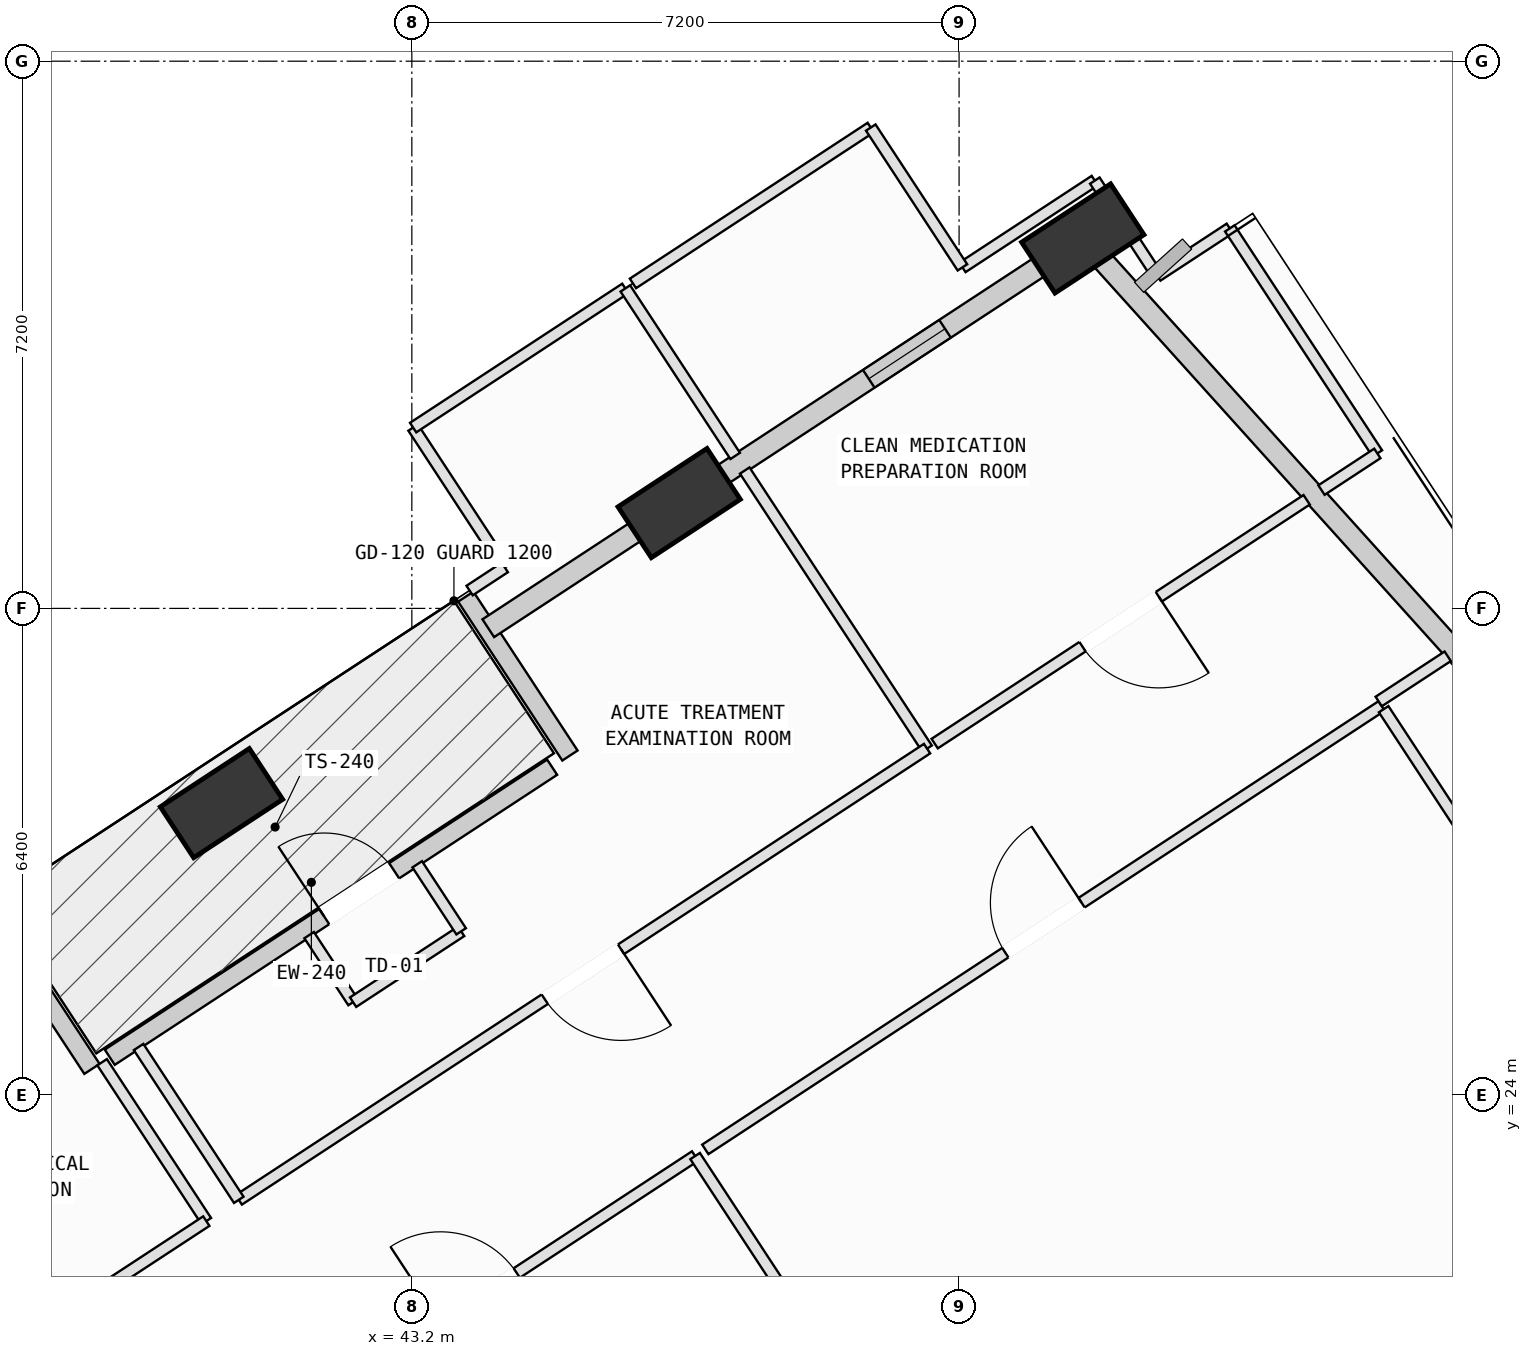
"""IFC4 building model, lengths in metres.
Left out: names, types, materials, properties, quantities, classifications, styles, units other than length and angle.
Written with IfcOpenShell. Run it as: python <this file> out.ifc"""

import sys

from ifc_helpers import new_model, si_unit, direction, frame, frame_2d, origin, origin_2d, place, context, subcontext, project, spatial, rectangle, extrude, element, fill, save


model = new_model("IFC4")
c1 = context("Model", 3, precision=1e-05, world=origin(), true_north=direction((0.0, 1.0)))
c2 = subcontext(c1, "Body", "Model", "MODEL_VIEW")
j1 = project(units=[si_unit("LENGTHUNIT", "METRE"), si_unit("PLANEANGLEUNIT", "RADIAN")], contexts=[c1])
p1 = place(None, origin())
s1 = spatial("IfcSite", under=j1, at=p1, CompositionType="ELEMENT")
p2 = place(p1, origin())
s2 = spatial("IfcBuilding", under=s1, at=p2, CompositionType="ELEMENT")
p3 = place(p2, frame((0.0, 0.0, 165.8)))
s3 = spatial("IfcBuildingStorey", under=s2, at=p3, CompositionType="ELEMENT", Elevation=165.8)
p4 = place(p3, frame((52.028, 35.268, 0.002), z_axis=(-0.043877725152, 0.075705811496, 0.996164331494), x_axis=(-0.449659174305, -0.89191078624, 0.047976831414)))
e1 = element("IfcColumn", 1, at=p4, inside=s3, PredefinedType="COLUMN", context=c2, shape_type="SweptSolid", body=[
    extrude(rectangle(XDim=1.4, YDim=0.8, at=origin_2d()), origin(), (0.0, 0.0, 1.0), 4.012),
])
p5 = place(p3, frame((46.717, 31.786, 0.002), z_axis=(-0.029390162986, 0.054024241505, 0.998107008116), x_axis=(-0.473093074248, -0.880366887856, 0.033720703821)))
e2 = element("IfcColumn", 2, at=p5, inside=s3, PredefinedType="COLUMN", context=c2, shape_type="SweptSolid", body=[
    extrude(rectangle(XDim=1.4, YDim=0.8, at=origin_2d()), origin(), (0.0, 0.0, 1.0), 4.004),
])
p6 = place(p3, frame((40.696, 27.838, 0.002), z_axis=(-0.012883611471, 0.029308689603, 0.999487375243), x_axis=(-0.545052318334, -0.838218249125, 0.017553834713)))
e3 = element("IfcColumn", 3, at=p6, inside=s3, PredefinedType="COLUMN", context=c2, shape_type="SweptSolid", body=[
    extrude(rectangle(XDim=1.4, YDim=0.8, at=origin_2d()), origin(), (0.0, 0.0, 1.0), 3.998),
])
p7 = place(p3, frame((39.226, 24.494, 0.0), z_axis=(0.0, 0.0, 1.0), x_axis=(0.83628365525, 0.548297043547, 0.0)))
e4 = element("IfcWall", 4, at=p7, inside=s3, PredefinedType="SOLIDWALL", context=c2, shape_type="SweptSolid", body=[
    extrude(rectangle(XDim=6.96, YDim=0.24, at=frame_2d((3.48, 0.0))), origin(), (0.0, 0.0, 1.0), 3.045),
])
p8 = place(p7, frame((3.375, 0.0, 0.0)))
e5 = element("IfcOpeningElement", 5, at=p8, cuts=e4, PredefinedType="OPENING", context=c2, shape_type="SweptSolid", body=[
    extrude(rectangle(XDim=1.1, YDim=2.15, at=frame_2d((0.55, 1.075))), frame((0.0, 0.13, 0.0), z_axis=(0.0, -1.0, 0.0), x_axis=(1.0, 0.0, 0.0)), (0.0, 0.0, 1.0), 0.26),
])
p9 = place(p3, frame((37.621, 26.432, 0.0), z_axis=(0.0, 0.0, 1.0), x_axis=(0.548306585328, -0.836277399244, 0.0)))
e6 = element("IfcWall", 6, at=p9, inside=s3, PredefinedType="SOLIDWALL", context=c2, shape_type="SweptSolid", body=[
    extrude(rectangle(XDim=2.5, YDim=0.24, at=frame_2d((1.25, 0.0))), origin(), (0.0, 0.0, 1.0), 3.165),
])
p10 = place(p3, frame((45.28, 28.464, 0.0), z_axis=(0.0, 0.0, 1.0), x_axis=(-0.548351364429, 0.836248038042, 0.0)))
e7 = element("IfcWall", 7, at=p10, inside=s3, PredefinedType="SOLIDWALL", context=c2, shape_type="SweptSolid", body=[
    extrude(rectangle(XDim=2.5, YDim=0.24, at=frame_2d((1.25, 0.0))), origin(), (0.0, 0.0, 1.0), 3.165),
])
p11 = place(p3, frame((52.244, 35.028, 0.0), z_axis=(0.0, 0.0, 1.0), x_axis=(0.669657355031, -0.742670200596, 0.0)))
e8 = element("IfcWall", 8, at=p11, inside=s3, PredefinedType="SOLIDWALL", context=c2, shape_type="SweptSolid", body=[
    extrude(rectangle(XDim=8.838, YDim=0.28, at=frame_2d((4.419, 0.0))), origin(), (0.0, 0.0, 1.0), 3.165),
])
p12 = place(p3, frame((47.128, 32.055, 0.0), z_axis=(0.0, 0.0, 1.0), x_axis=(0.836292582583, 0.548283426995, 0.0)))
e9 = element("IfcWall", 9, at=p12, inside=s3, PredefinedType="SOLIDWALL", context=c2, shape_type="SweptSolid", body=[
    extrude(rectangle(XDim=5.405, YDim=0.28, at=frame_2d((2.702, 0.0))), origin(), (0.0, 0.0, 1.0), 3.165),
])
p13 = place(p12, frame((2.492, 0.0, 0.75)))
e10 = element("IfcOpeningElement", 10, at=p13, cuts=e9, PredefinedType="OPENING", context=c2, shape_type="SweptSolid", body=[
    extrude(rectangle(XDim=1.2, YDim=1.75, at=frame_2d((0.6, 0.875))), frame((0.0, 0.15, 0.0), z_axis=(0.0, -1.0, 0.0), x_axis=(1.0, 0.0, 0.0)), (0.0, 0.0, 1.0), 0.3),
])
p14 = place(p3, frame((44.206, 30.139, 0.0), z_axis=(0.0, 0.0, 1.0), x_axis=(0.836311759285, 0.548254175799, 0.0)))
e11 = element("IfcWall", 11, at=p14, inside=s3, PredefinedType="SOLIDWALL", context=c2, shape_type="SweptSolid", body=[
    extrude(rectangle(XDim=2.532, YDim=0.28, at=frame_2d((1.266, 0.0))), origin(), (0.0, 0.0, 1.0), 3.045),
])
p15 = place(p3, frame((41.23, 19.459, 0.0), z_axis=(0.0, 0.0, 1.0), x_axis=(0.836287739874, 0.548290813471, 0.0)))
e12 = element("IfcWall", 12, at=p15, inside=s3, PredefinedType="PARTITIONING", context=c2, shape_type="SweptSolid", body=[
    extrude(rectangle(XDim=6.812, YDim=0.15, at=frame_2d((3.406, 0.0))), origin(), (0.0, 0.0, 1.0), 3.065),
])
p16 = place(p15, frame((2.806, 0.0, 0.0)))
e13 = element("IfcOpeningElement", 13, at=p16, cuts=e12, PredefinedType="OPENING", context=c2, shape_type="SweptSolid", body=[
    extrude(rectangle(XDim=1.2, YDim=2.15, at=frame_2d((0.6, 1.075))), frame((0.0, 0.085, 0.0), z_axis=(0.0, -1.0, 0.0), x_axis=(1.0, 0.0, 0.0)), (0.0, 0.0, 1.0), 0.17),
])
p17 = place(p3, frame((46.927, 23.194, 0.0), z_axis=(0.0, 0.0, 1.0), x_axis=(0.54831669657, -0.836270769705, 0.0)))
e14 = element("IfcWall", 14, at=p17, inside=s3, PredefinedType="PARTITIONING", context=c2, shape_type="SweptSolid", body=[
    extrude(rectangle(XDim=13.485, YDim=0.15, at=frame_2d((6.743, 0.0))), origin(), (0.0, 0.0, 1.0), 3.415),
])
p18 = place(p3, frame((47.061, 23.282, 0.0), z_axis=(0.0, 0.0, 1.0), x_axis=(0.836276104337, 0.548308560315, 0.0)))
e15 = element("IfcWall", 15, at=p18, inside=s3, PredefinedType="PARTITIONING", context=c2, shape_type="SweptSolid", body=[
    extrude(rectangle(XDim=10.64, YDim=0.15, at=frame_2d((5.32, 0.0))), origin(), (0.0, 0.0, 1.0), 3.78),
])
p19 = place(p18, frame((4.72, 0.0, 0.0)))
e16 = element("IfcOpeningElement", 16, at=p19, cuts=e15, PredefinedType="OPENING", context=c2, shape_type="SweptSolid", body=[
    extrude(rectangle(XDim=1.2, YDim=2.15, at=frame_2d((0.6, 1.075))), frame((0.0, 0.085, 0.0), z_axis=(0.0, -1.0, 0.0), x_axis=(1.0, 0.0, 0.0)), (0.0, 0.0, 1.0), 0.17),
])
p20 = place(p3, frame((55.986, 29.074, 0.0), z_axis=(0.0, 0.0, 1.0), x_axis=(0.548346156001, -0.836251453332, 0.0)))
e17 = element("IfcWall", 17, at=p20, inside=s3, PredefinedType="PARTITIONING", context=c2, shape_type="SweptSolid", body=[
    extrude(rectangle(XDim=11.396, YDim=0.15, at=frame_2d((5.698, 0.0))), origin(), (0.0, 0.0, 1.0), 3.78),
])
p21 = place(p20, frame((5.268, 0.0, 0.0)))
e18 = element("IfcOpeningElement", 18, at=p21, cuts=e17, PredefinedType="OPENING", context=c2, shape_type="SweptSolid", body=[
    extrude(rectangle(XDim=0.86, YDim=2.06, at=frame_2d((0.43, 1.03))), frame((0.0, 0.085, 0.0), z_axis=(0.0, -1.0, 0.0), x_axis=(1.0, 0.0, 0.0)), (0.0, 0.0, 1.0), 0.17),
])
p22 = place(p3, frame((39.125, 24.429, 0.0), z_axis=(0.0, 0.0, 1.0), x_axis=(0.548330098424, -0.836261982373, 0.0)))
e19 = element("IfcWall", 19, at=p22, inside=s3, PredefinedType="PARTITIONING", context=c2, shape_type="SweptSolid", body=[
    extrude(rectangle(XDim=2.5, YDim=0.15, at=frame_2d((1.25, 0.0))), origin(), (0.0, 0.0, 1.0), 3.78),
])
p23 = place(p3, frame((40.496, 22.338, 0.0), z_axis=(0.0, 0.0, 1.0), x_axis=(-0.836310513297, -0.548256076436, 0.0)))
e20 = element("IfcWall", 20, at=p23, inside=s3, PredefinedType="PARTITIONING", context=c2, shape_type="SweptSolid", body=[
    extrude(rectangle(XDim=3.024, YDim=0.15, at=frame_2d((1.512, 0.0))), origin(), (0.0, 0.0, 1.0), 3.045),
])
p24 = place(p3, frame((44.423, 30.939, 0.0), z_axis=(0.0, 0.0, 1.0), x_axis=(-0.548178851416, 0.836361134236, 0.0)))
e21 = element("IfcWall", 21, at=p24, inside=s3, PredefinedType="PARTITIONING", context=c2, shape_type="SweptSolid", body=[
    extrude(rectangle(XDim=2.2, YDim=0.15, at=frame_2d((1.1, 0.0))), origin(), (0.0, 0.0, 1.0), 3.78),
])
p25 = place(p3, frame((43.217, 32.779, 0.0), z_axis=(0.0, 0.0, 1.0), x_axis=(0.83621138517, 0.548407256801, 0.0)))
e22 = element("IfcWall", 22, at=p25, inside=s3, PredefinedType="PARTITIONING", context=c2, shape_type="SweptSolid", body=[
    extrude(rectangle(XDim=3.339, YDim=0.15, at=frame_2d((1.669, 0.0))), origin(), (0.0, 0.0, 1.0), 3.78),
])
p26 = place(p3, frame((46.009, 34.61, 0.0), z_axis=(0.0, 0.0, 1.0), x_axis=(0.548292182189, -0.836286842507, 0.0)))
e23 = element("IfcWall", 23, at=p26, inside=s3, PredefinedType="PARTITIONING", context=c2, shape_type="SweptSolid", body=[
    extrude(rectangle(XDim=2.635, YDim=0.15, at=frame_2d((1.318, 0.0))), origin(), (0.0, 0.0, 1.0), 3.78),
])
p27 = place(p3, frame((47.58, 32.214, 0.0), z_axis=(0.0, 0.0, 1.0), x_axis=(0.548271243698, -0.836300569971, 0.0)))
e24 = element("IfcWall", 24, at=p27, inside=s3, PredefinedType="PARTITIONING", context=c2, shape_type="SweptSolid", body=[
    extrude(rectangle(XDim=4.375, YDim=0.15, at=frame_2d((2.188, 0.0))), origin(), (0.0, 0.0, 1.0), 3.78),
])
p28 = place(p3, frame((49.979, 28.555, 0.0), z_axis=(0.0, 0.0, 1.0), x_axis=(-0.836298938049, -0.548273732927, 0.0)))
e25 = element("IfcWall", 25, at=p28, inside=s3, PredefinedType="PARTITIONING", context=c2, shape_type="SweptSolid", body=[
    extrude(rectangle(XDim=10.829, YDim=0.15, at=frame_2d((5.414, 0.0))), origin(), (0.0, 0.0, 1.0), 3.78),
])
p29 = place(p28, frame((4.814, 0.0, 0.0)))
e26 = element("IfcOpeningElement", 26, at=p29, cuts=e25, PredefinedType="OPENING", context=c2, shape_type="SweptSolid", body=[
    extrude(rectangle(XDim=1.2, YDim=2.15, at=frame_2d((0.6, 1.075))), frame((0.0, 0.085, 0.0), z_axis=(0.0, -1.0, 0.0), x_axis=(1.0, 0.0, 0.0)), (0.0, 0.0, 1.0), 0.17),
])
p30 = place(p3, frame((40.923, 22.618, 0.0), z_axis=(0.0, 0.0, 1.0), x_axis=(-0.548192826292, 0.836351974471, 0.0)))
e27 = element("IfcWall", 27, at=p30, inside=s3, PredefinedType="PARTITIONING", context=c2, shape_type="SweptSolid", body=[
    extrude(rectangle(XDim=2.405, YDim=0.15, at=frame_2d((1.202, 0.0))), origin(), (0.0, 0.0, 1.0), 3.78),
])
p31 = place(p3, frame((41.849, 26.101, 0.0), z_axis=(0.0, 0.0, 1.0), x_axis=(0.548003914247, -0.836475767712, 0.0)))
e28 = element("IfcWall", 28, at=p31, inside=s3, PredefinedType="PARTITIONING", context=c2, shape_type="SweptSolid", body=[
    extrude(rectangle(XDim=1.054, YDim=0.15, at=frame_2d((0.527, 0.0))), origin(), (0.0, 0.0, 1.0), 3.78),
])
p32 = place(p3, frame((42.427, 25.219, 0.0), z_axis=(0.0, 0.0, 1.0), x_axis=(0.836420271781, 0.548088614144, 0.0)))
e29 = element("IfcWall", 29, at=p32, inside=s3, PredefinedType="PARTITIONING", context=c2, shape_type="SweptSolid", body=[
    extrude(rectangle(XDim=1.7, YDim=0.15, at=frame_2d((0.85, 0.0))), origin(), (0.0, 0.0, 1.0), 3.78),
])
p33 = place(p3, frame((43.849, 26.151, 0.0), z_axis=(0.0, 0.0, 1.0), x_axis=(-0.548165874885, 0.836369639341, 0.0)))
e30 = element("IfcWall", 30, at=p33, inside=s3, PredefinedType="PARTITIONING", context=c2, shape_type="SweptSolid", body=[
    extrude(rectangle(XDim=1.055, YDim=0.15, at=frame_2d((0.527, 0.0))), origin(), (0.0, 0.0, 1.0), 3.78),
])
p34 = place(p3, frame((43.96, 30.635, 0.0), z_axis=(0.0, 0.0, 1.0), x_axis=(0.836028958257, 0.548685320522, 0.0)))
e31 = element("IfcWall", 31, at=p34, inside=s3, PredefinedType="PARTITIONING", context=c2, shape_type="SweptSolid", body=[
    extrude(rectangle(XDim=0.554, YDim=0.15, at=frame_2d((0.277, 0.0))), origin(), (0.0, 0.0, 1.0), 3.145),
])
p35 = place(p3, frame((50.444, 34.887, 0.0), z_axis=(0.0, 0.0, 1.0), x_axis=(0.83628137168, 0.54830052652, 0.0)))
e32 = element("IfcWall", 32, at=p35, inside=s3, PredefinedType="PARTITIONING", context=c2, shape_type="SweptSolid", body=[
    extrude(rectangle(XDim=2.083, YDim=0.15, at=frame_2d((1.042, 0.0))), origin(), (0.0, 0.0, 1.0), 3.165),
])
p36 = place(p3, frame((52.186, 36.029, 0.0), z_axis=(0.0, 0.0, 1.0), x_axis=(0.548183369376, -0.836358172998, 0.0)))
e33 = element("IfcWall", 33, at=p36, inside=s3, PredefinedType="PARTITIONING", context=c2, shape_type="SweptSolid", body=[
    extrude(rectangle(XDim=1.5, YDim=0.15, at=frame_2d((0.75, 0.0))), origin(), (0.0, 0.0, 1.0), 3.165),
])
p37 = place(p3, frame((53.008, 34.775, 0.0), z_axis=(0.0, 0.0, 1.0), x_axis=(0.836437440317, 0.548062412903, 0.0)))
e34 = element("IfcWall", 34, at=p37, inside=s3, PredefinedType="PARTITIONING", context=c2, shape_type="SweptSolid", body=[
    extrude(rectangle(XDim=1.14, YDim=0.15, at=frame_2d((0.57, 0.0))), origin(), (0.0, 0.0, 1.0), 3.78),
])
p38 = place(p3, frame((53.962, 35.4, 0.0), z_axis=(0.0, 0.0, 1.0), x_axis=(0.54827079321, -0.836300865307, 0.0)))
e35 = element("IfcWall", 35, at=p38, inside=s3, PredefinedType="PARTITIONING", context=c2, shape_type="SweptSolid", body=[
    extrude(rectangle(XDim=3.541, YDim=0.15, at=frame_2d((1.77, 0.0))), origin(), (0.0, 0.0, 1.0), 3.78),
])
p39 = place(p3, frame((55.903, 32.439, 0.0), z_axis=(0.0, 0.0, 1.0), x_axis=(-0.836298649648, -0.548274172834, 0.0)))
e36 = element("IfcWall", 36, at=p39, inside=s3, PredefinedType="PARTITIONING", context=c2, shape_type="SweptSolid", body=[
    extrude(rectangle(XDim=0.879, YDim=0.15, at=frame_2d((0.439, 0.0))), origin(), (0.0, 0.0, 1.0), 3.78),
])
p40 = place(p3, frame((54.973, 31.829, 0.0), z_axis=(0.0, 0.0, 1.0), x_axis=(-0.836325905436, -0.548232596529, 0.0)))
e37 = element("IfcWall", 37, at=p40, inside=s3, PredefinedType="PARTITIONING", context=c2, shape_type="SweptSolid", body=[
    extrude(rectangle(XDim=5.852, YDim=0.15, at=frame_2d((2.926, 0.0))), origin(), (0.0, 0.0, 1.0), 3.78),
])
p41 = place(p40, frame((2.326, 0.0, 0.0)))
e38 = element("IfcOpeningElement", 38, at=p41, cuts=e37, PredefinedType="OPENING", context=c2, shape_type="SweptSolid", body=[
    extrude(rectangle(XDim=1.2, YDim=2.15, at=frame_2d((0.6, 1.075))), frame((0.0, 0.085, 0.0), z_axis=(0.0, -1.0, 0.0), x_axis=(1.0, 0.0, 0.0)), (0.0, 0.0, 1.0), 0.17),
])
p42 = place(p3, frame((46.109, 34.676, 0.0), z_axis=(0.0, 0.0, 1.0), x_axis=(0.836351778338, 0.548193125522, 0.0)))
e39 = element("IfcWall", 39, at=p42, inside=s3, PredefinedType="PARTITIONING", context=c2, shape_type="SweptSolid", body=[
    extrude(rectangle(XDim=3.741, YDim=0.15, at=frame_2d((1.871, 0.0))), origin(), (0.0, 0.0, 1.0), 3.78),
])
p43 = place(p3, frame((49.238, 36.727, 0.0), z_axis=(0.0, 0.0, 1.0), x_axis=(0.548178851416, -0.836361134236, 0.0)))
e40 = element("IfcWall", 40, at=p43, inside=s3, PredefinedType="PARTITIONING", context=c2, shape_type="SweptSolid", body=[
    extrude(rectangle(XDim=2.2, YDim=0.15, at=frame_2d((1.1, 0.0))), origin(), (0.0, 0.0, 1.0), 3.78),
])
p44 = place(p3, frame((55.921, 29.175, 0.0), z_axis=(0.0, 0.0, 1.0), x_axis=(0.836486009436, 0.547988280913, 0.0)))
e41 = element("IfcWall", 41, at=p44, inside=s3, PredefinedType="PARTITIONING", context=c2, shape_type="SweptSolid", body=[
    extrude(rectangle(XDim=1.086, YDim=0.15, at=frame_2d((0.543, 0.0))), origin(), (0.0, 0.0, 1.0), 3.78),
])
p45 = place(p8, origin())
e42 = element("IfcDoor", 42, at=p45, inside=s3, OperationType="SINGLE_SWING_LEFT", PredefinedType="DOOR", context=c2, shape_type="SweptSolid", body=[
    extrude(rectangle(XDim=1.1, YDim=2.15, at=frame_2d((0.55, 1.075))), frame((0.0, 0.025, 0.0), z_axis=(0.0, -1.0, 0.0), x_axis=(1.0, 0.0, 0.0)), (0.0, 0.0, 1.0), 0.05),
])
fill(e5, e42)
p46 = place(p13, origin())
e43 = element("IfcWindow", 43, at=p46, inside=s3, PartitioningType="SINGLE_PANEL", PredefinedType="WINDOW", context=c2, shape_type="SweptSolid", body=[
    extrude(rectangle(XDim=1.2, YDim=1.75, at=frame_2d((0.6, 0.875))), frame((0.0, 0.03, 0.0), z_axis=(0.0, -1.0, 0.0), x_axis=(1.0, 0.0, 0.0)), (0.0, 0.0, 1.0), 0.06),
])
fill(e10, e43)
p47 = place(p16, origin())
e44 = element("IfcDoor", 44, at=p47, inside=s3, OperationType="SINGLE_SWING_LEFT", PredefinedType="DOOR", context=c2, shape_type="SweptSolid", body=[
    extrude(rectangle(XDim=1.2, YDim=2.15, at=frame_2d((0.6, 1.075))), frame((0.0, 0.025, 0.0), z_axis=(0.0, -1.0, 0.0), x_axis=(1.0, 0.0, 0.0)), (0.0, 0.0, 1.0), 0.05),
])
fill(e13, e44)
p48 = place(p19, origin())
e45 = element("IfcDoor", 45, at=p48, inside=s3, OperationType="SINGLE_SWING_RIGHT", PredefinedType="DOOR", context=c2, shape_type="SweptSolid", body=[
    extrude(rectangle(XDim=1.2, YDim=2.15, at=frame_2d((0.6, 1.075))), frame((0.0, 0.025, 0.0), z_axis=(0.0, -1.0, 0.0), x_axis=(1.0, 0.0, 0.0)), (0.0, 0.0, 1.0), 0.05),
])
fill(e16, e45)
p49 = place(p29, origin())
e46 = element("IfcDoor", 46, at=p49, inside=s3, OperationType="SINGLE_SWING_LEFT", PredefinedType="DOOR", context=c2, shape_type="SweptSolid", body=[
    extrude(rectangle(XDim=1.2, YDim=2.15, at=frame_2d((0.6, 1.075))), frame((0.0, 0.025, 0.0), z_axis=(0.0, -1.0, 0.0), x_axis=(1.0, 0.0, 0.0)), (0.0, 0.0, 1.0), 0.05),
])
fill(e26, e46)
p50 = place(p41, origin())
e47 = element("IfcDoor", 47, at=p50, inside=s3, OperationType="SINGLE_SWING_LEFT", PredefinedType="DOOR", context=c2, shape_type="SweptSolid", body=[
    extrude(rectangle(XDim=1.2, YDim=2.15, at=frame_2d((0.6, 1.075))), frame((0.0, 0.025, 0.0), z_axis=(0.0, -1.0, 0.0), x_axis=(1.0, 0.0, 0.0)), (0.0, 0.0, 1.0), 0.05),
])
fill(e38, e47)
save(model, sys.argv[1])
